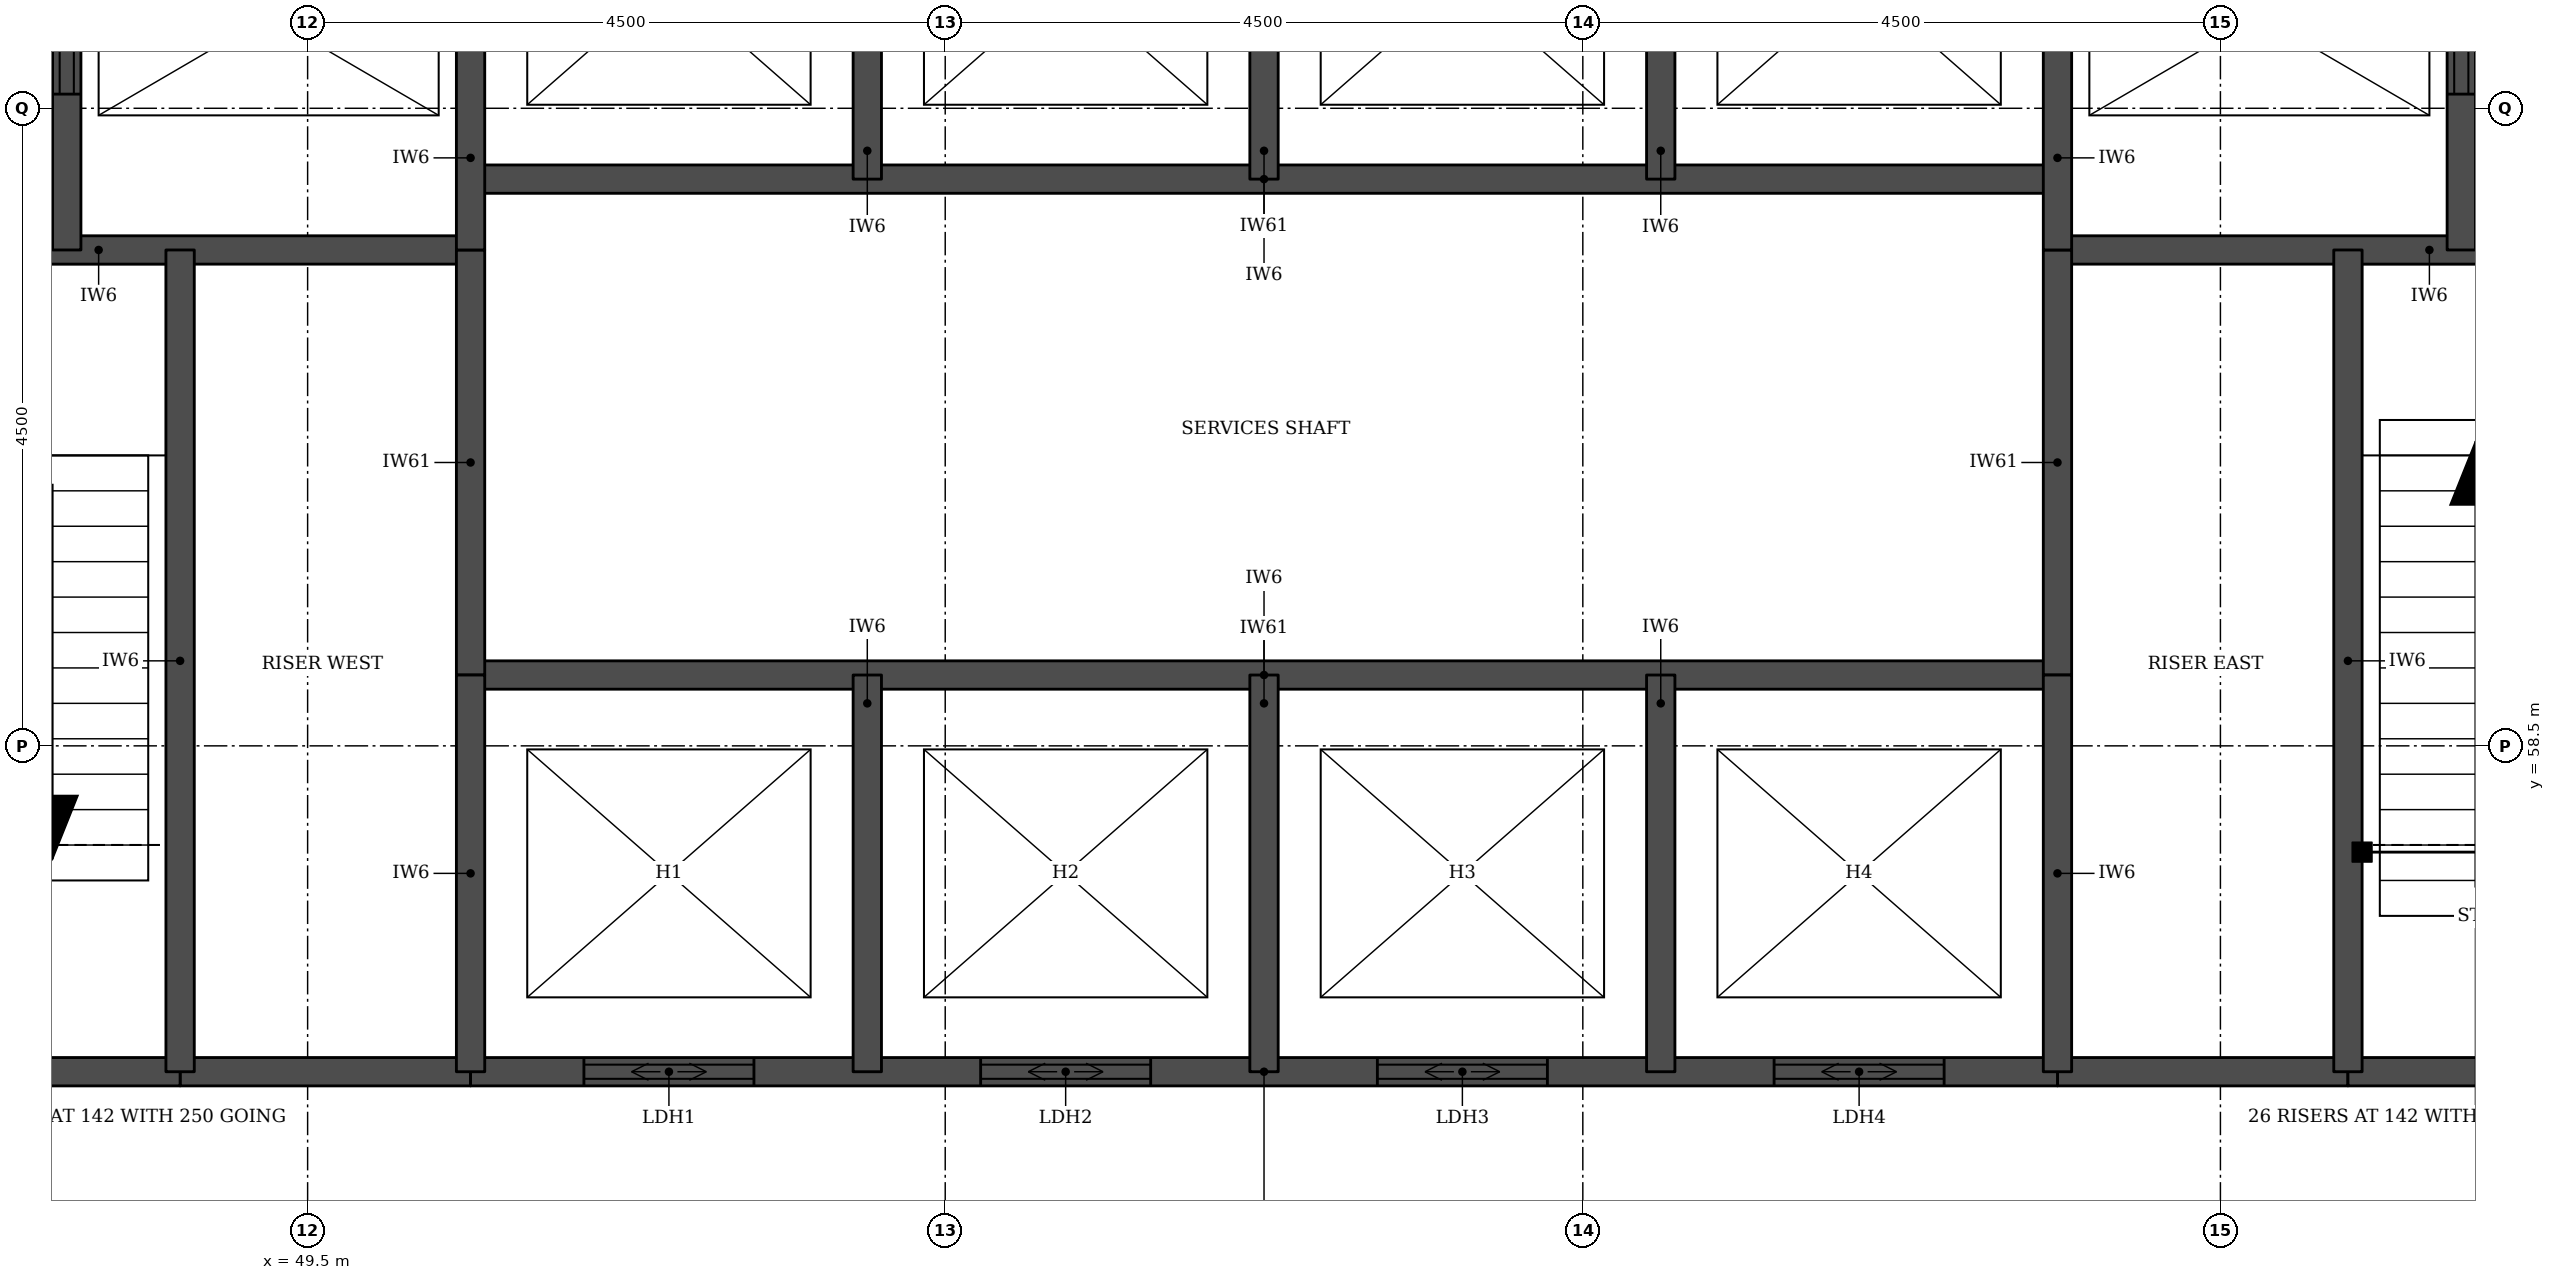
"""IFC4 building model, lengths in metres.
Left out: names, types, materials, properties, quantities, classifications, styles, units other than length and angle.
Written with IfcOpenShell. Run it as: python <this file> out.ifc"""

import sys

from ifc_helpers import new_model, si_unit, direction, frame, frame_2d, origin, place, context, subcontext, project, spatial, rectangle, extrude, element, fill, save


model = new_model("IFC4")
c1 = context("Model", 3, precision=1e-05, world=origin(), true_north=direction((0.0, 1.0)))
c2 = subcontext(c1, "Body", "Model", "MODEL_VIEW")
j1 = project(units=[si_unit("LENGTHUNIT", "METRE"), si_unit("PLANEANGLEUNIT", "RADIAN")], contexts=[c1])
p1 = place(None, origin())
s1 = spatial("IfcSite", under=j1, at=p1, CompositionType="ELEMENT")
p2 = place(p1, origin())
s2 = spatial("IfcBuilding", under=s1, at=p2, CompositionType="ELEMENT")
p3 = place(p2, frame((0.0, 0.0, 223.0)))
s3 = spatial("IfcBuildingStorey", under=s2, at=p3, CompositionType="ELEMENT", Elevation=223.0)
for number, where, z_axis, x_axis in (
    (1, (48.6, 56.2, 0.0), (0.0, 0.0, 1.0), (1.0, 0.0, 0.0)),
    (2, (61.85, 56.2, 0.0), (0.0, 0.0, 1.0), (1.0, 0.0, 0.0)),
):
    element("IfcWall", number, at=place(p3, frame(where, z_axis=z_axis, x_axis=x_axis)), inside=s3, PredefinedType="SOLIDWALL", context=c2, shape_type="SweptSolid", body=[
        extrude(rectangle(XDim=2.05, YDim=0.2, at=frame_2d((1.025, 0.0))), origin(), (0.0, 0.0, 1.0), 3.55),
    ])
p4 = place(p3, frame((45.4, 56.2, 0.0), z_axis=(0.0, 0.0, 1.0), x_axis=(1.0, 0.0, 0.0)))
e3 = element("IfcWall", 3, at=p4, inside=s3, PredefinedType="SOLIDWALL", context=c2, shape_type="SweptSolid", body=[
    extrude(rectangle(XDim=3.2, YDim=0.2, at=frame_2d((1.6, 0.0))), origin(), (0.0, 0.0, 1.0), 3.55),
])
p5 = place(p3, frame((50.65, 56.2, 0.0), z_axis=(0.0, 0.0, 1.0), x_axis=(1.0, 0.0, 0.0)))
e4 = element("IfcWall", 4, at=p5, inside=s3, PredefinedType="SOLIDWALL", context=c2, shape_type="SweptSolid", body=[
    extrude(rectangle(XDim=11.2, YDim=0.2, at=frame_2d((5.6, 0.0))), origin(), (0.0, 0.0, 1.0), 3.55),
])
p6 = place(p5, frame((0.8, 0.0, 0.0)))
e5 = element("IfcOpeningElement", 5, at=p6, cuts=e4, PredefinedType="OPENING", context=c2, shape_type="SweptSolid", body=[
    extrude(rectangle(XDim=1.2, YDim=2.1, at=frame_2d((0.6, 1.05))), frame((0.0, 0.11, 0.0), z_axis=(0.0, -1.0, 0.0), x_axis=(1.0, 0.0, 0.0)), (0.0, 0.0, 1.0), 0.22),
])
p7 = place(p5, frame((3.6, 0.0, 0.0)))
e6 = element("IfcOpeningElement", 6, at=p7, cuts=e4, PredefinedType="OPENING", context=c2, shape_type="SweptSolid", body=[
    extrude(rectangle(XDim=1.2, YDim=2.1, at=frame_2d((0.6, 1.05))), frame((0.0, 0.11, 0.0), z_axis=(0.0, -1.0, 0.0), x_axis=(1.0, 0.0, 0.0)), (0.0, 0.0, 1.0), 0.22),
])
p8 = place(p5, frame((6.4, 0.0, 0.0)))
e7 = element("IfcOpeningElement", 7, at=p8, cuts=e4, PredefinedType="OPENING", context=c2, shape_type="SweptSolid", body=[
    extrude(rectangle(XDim=1.2, YDim=2.1, at=frame_2d((0.6, 1.05))), frame((0.0, 0.11, 0.0), z_axis=(0.0, -1.0, 0.0), x_axis=(1.0, 0.0, 0.0)), (0.0, 0.0, 1.0), 0.22),
])
p9 = place(p5, frame((9.2, 0.0, 0.0)))
e8 = element("IfcOpeningElement", 8, at=p9, cuts=e4, PredefinedType="OPENING", context=c2, shape_type="SweptSolid", body=[
    extrude(rectangle(XDim=1.2, YDim=2.1, at=frame_2d((0.6, 1.05))), frame((0.0, 0.11, 0.0), z_axis=(0.0, -1.0, 0.0), x_axis=(1.0, 0.0, 0.0)), (0.0, 0.0, 1.0), 0.22),
])
p10 = place(p3, frame((63.9, 56.2, 0.0), z_axis=(0.0, 0.0, 1.0), x_axis=(1.0, 0.0, 0.0)))
e9 = element("IfcWall", 9, at=p10, inside=s3, PredefinedType="SOLIDWALL", context=c2, shape_type="SweptSolid", body=[
    extrude(rectangle(XDim=3.2, YDim=0.2, at=frame_2d((1.6, 0.0))), origin(), (0.0, 0.0, 1.0), 3.55),
])
p11 = place(p3, frame((50.65, 59.0, 0.0), z_axis=(0.0, 0.0, 1.0), x_axis=(1.0, 0.0, 0.0)))
e10 = element("IfcWall", 10, at=p11, inside=s3, PredefinedType="SOLIDWALL", context=c2, shape_type="SweptSolid", body=[
    extrude(rectangle(XDim=11.2, YDim=0.2, at=frame_2d((5.6, 0.0))), origin(), (0.0, 0.0, 1.0), 3.7),
])
for number, where, z_axis, x_axis in (
    (11, (45.4, 62.0, 0.0), (0.0, 0.0, 1.0), (1.0, 0.0, 0.0)),
    (12, (61.85, 62.0, 0.0), (0.0, 0.0, 1.0), (1.0, 0.0, 0.0)),
):
    element("IfcWall", number, at=place(p3, frame(where, z_axis=z_axis, x_axis=x_axis)), inside=s3, PredefinedType="SOLIDWALL", context=c2, shape_type="SweptSolid", body=[
        extrude(rectangle(XDim=5.25, YDim=0.2, at=frame_2d((2.625, 0.0))), origin(), (0.0, 0.0, 1.0), 3.55),
    ])
p12 = place(p3, frame((50.65, 62.5, 0.0), z_axis=(0.0, 0.0, 1.0), x_axis=(1.0, 0.0, 0.0)))
e13 = element("IfcWall", 13, at=p12, inside=s3, PredefinedType="SOLIDWALL", context=c2, shape_type="SweptSolid", body=[
    extrude(rectangle(XDim=11.2, YDim=0.2, at=frame_2d((5.6, 0.0))), origin(), (0.0, 0.0, 1.0), 3.7),
])
p13 = place(p3, frame((47.8, 62.0, 0.0), z_axis=(0.0, 0.0, 1.0), x_axis=(0.0, 1.0, 0.0)))
e14 = element("IfcWall", 14, at=p13, inside=s3, PredefinedType="SOLIDWALL", context=c2, shape_type="SweptSolid", body=[
    extrude(rectangle(XDim=3.3, YDim=0.2, at=frame_2d((1.65, 0.0))), origin(), (0.0, 0.0, 1.0), 3.55),
])
p14 = place(p13, frame((1.1, 0.0, 0.0)))
e15 = element("IfcOpeningElement", 15, at=p14, cuts=e14, PredefinedType="OPENING", context=c2, shape_type="SweptSolid", body=[
    extrude(rectangle(XDim=1.1, YDim=2.1, at=frame_2d((0.55, 1.05))), frame((0.0, 0.11, 0.0), z_axis=(0.0, -1.0, 0.0), x_axis=(1.0, 0.0, 0.0)), (0.0, 0.0, 1.0), 0.22),
])
p15 = place(p3, frame((48.6, 56.2, 0.0), z_axis=(0.0, 0.0, 1.0), x_axis=(0.0, 1.0, 0.0)))
e16 = element("IfcWall", 16, at=p15, inside=s3, PredefinedType="SOLIDWALL", context=c2, shape_type="SweptSolid", body=[
    extrude(rectangle(XDim=5.8, YDim=0.2, at=frame_2d((2.9, 0.0))), origin(), (0.0, 0.0, 1.0), 3.55),
])
p16 = place(p3, frame((50.65, 59.0, 0.0), z_axis=(0.0, 0.0, 1.0), x_axis=(0.0, 1.0, 0.0)))
e17 = element("IfcWall", 17, at=p16, inside=s3, PredefinedType="SOLIDWALL", context=c2, shape_type="SweptSolid", body=[
    extrude(rectangle(XDim=3.0, YDim=0.2, at=frame_2d((1.5, 0.0))), origin(), (0.0, 0.0, 1.0), 3.7),
])
p17 = place(p3, frame((50.65, 56.2, 0.0), z_axis=(0.0, 0.0, 1.0), x_axis=(0.0, 1.0, 0.0)))
e18 = element("IfcWall", 18, at=p17, inside=s3, PredefinedType="SOLIDWALL", context=c2, shape_type="SweptSolid", body=[
    extrude(rectangle(XDim=2.8, YDim=0.2, at=frame_2d((1.4, 0.0))), origin(), (0.0, 0.0, 1.0), 3.55),
])
p18 = place(p3, frame((50.65, 62.0, 0.0), z_axis=(0.0, 0.0, 1.0), x_axis=(0.0, 1.0, 0.0)))
e19 = element("IfcWall", 19, at=p18, inside=s3, PredefinedType="SOLIDWALL", context=c2, shape_type="SweptSolid", body=[
    extrude(rectangle(XDim=3.3, YDim=0.2, at=frame_2d((1.65, 0.0))), origin(), (0.0, 0.0, 1.0), 3.55),
])
for number, where, z_axis, x_axis in (
    (20, (53.45, 56.2, 0.0), (0.0, 0.0, 1.0), (0.0, 1.0, 0.0)),
    (21, (53.45, 62.5, 0.0), (0.0, 0.0, 1.0), (0.0, 1.0, 0.0)),
    (22, (56.25, 56.2, 0.0), (0.0, 0.0, 1.0), (0.0, 1.0, 0.0)),
    (23, (56.25, 62.5, 0.0), (0.0, 0.0, 1.0), (0.0, 1.0, 0.0)),
    (24, (59.05, 56.2, 0.0), (0.0, 0.0, 1.0), (0.0, 1.0, 0.0)),
    (25, (59.05, 62.5, 0.0), (0.0, 0.0, 1.0), (0.0, 1.0, 0.0)),
):
    element("IfcWall", number, at=place(p3, frame(where, z_axis=z_axis, x_axis=x_axis)), inside=s3, PredefinedType="SOLIDWALL", context=c2, shape_type="SweptSolid", body=[
        extrude(rectangle(XDim=2.8, YDim=0.2, at=frame_2d((1.4, 0.0))), origin(), (0.0, 0.0, 1.0), 3.55),
    ])
p19 = place(p3, frame((61.85, 59.0, 0.0), z_axis=(0.0, 0.0, 1.0), x_axis=(0.0, 1.0, 0.0)))
e26 = element("IfcWall", 26, at=p19, inside=s3, PredefinedType="SOLIDWALL", context=c2, shape_type="SweptSolid", body=[
    extrude(rectangle(XDim=3.0, YDim=0.2, at=frame_2d((1.5, 0.0))), origin(), (0.0, 0.0, 1.0), 3.7),
])
p20 = place(p3, frame((61.85, 56.2, 0.0), z_axis=(0.0, 0.0, 1.0), x_axis=(0.0, 1.0, 0.0)))
e27 = element("IfcWall", 27, at=p20, inside=s3, PredefinedType="SOLIDWALL", context=c2, shape_type="SweptSolid", body=[
    extrude(rectangle(XDim=2.8, YDim=0.2, at=frame_2d((1.4, 0.0))), origin(), (0.0, 0.0, 1.0), 3.55),
])
p21 = place(p3, frame((61.85, 62.0, 0.0), z_axis=(0.0, 0.0, 1.0), x_axis=(0.0, 1.0, 0.0)))
e28 = element("IfcWall", 28, at=p21, inside=s3, PredefinedType="SOLIDWALL", context=c2, shape_type="SweptSolid", body=[
    extrude(rectangle(XDim=3.3, YDim=0.2, at=frame_2d((1.65, 0.0))), origin(), (0.0, 0.0, 1.0), 3.55),
])
p22 = place(p3, frame((63.9, 56.2, 0.0), z_axis=(0.0, 0.0, 1.0), x_axis=(0.0, 1.0, 0.0)))
e29 = element("IfcWall", 29, at=p22, inside=s3, PredefinedType="SOLIDWALL", context=c2, shape_type="SweptSolid", body=[
    extrude(rectangle(XDim=5.8, YDim=0.2, at=frame_2d((2.9, 0.0))), origin(), (0.0, 0.0, 1.0), 3.55),
])
p23 = place(p3, frame((64.7, 62.0, 0.0), z_axis=(0.0, 0.0, 1.0), x_axis=(0.0, 1.0, 0.0)))
e30 = element("IfcWall", 30, at=p23, inside=s3, PredefinedType="SOLIDWALL", context=c2, shape_type="SweptSolid", body=[
    extrude(rectangle(XDim=3.3, YDim=0.2, at=frame_2d((1.65, 0.0))), origin(), (0.0, 0.0, 1.0), 3.55),
])
p24 = place(p23, frame((1.1, 0.0, 0.0)))
e31 = element("IfcOpeningElement", 31, at=p24, cuts=e30, PredefinedType="OPENING", context=c2, shape_type="SweptSolid", body=[
    extrude(rectangle(XDim=1.1, YDim=2.1, at=frame_2d((0.55, 1.05))), frame((0.0, 0.11, 0.0), z_axis=(0.0, -1.0, 0.0), x_axis=(1.0, 0.0, 0.0)), (0.0, 0.0, 1.0), 0.22),
])
p25 = place(p6, origin())
e32 = element("IfcDoor", 32, at=p25, inside=s3, OperationType="DOUBLE_DOOR_SLIDING", PredefinedType="DOOR", context=c2, shape_type="SweptSolid", body=[
    extrude(rectangle(XDim=1.2, YDim=2.1, at=frame_2d((0.6, 1.05))), frame((0.0, 0.025, 0.0), z_axis=(0.0, -1.0, 0.0), x_axis=(1.0, 0.0, 0.0)), (0.0, 0.0, 1.0), 0.05),
])
fill(e5, e32)
p26 = place(p7, origin())
e33 = element("IfcDoor", 33, at=p26, inside=s3, OperationType="DOUBLE_DOOR_SLIDING", PredefinedType="DOOR", context=c2, shape_type="SweptSolid", body=[
    extrude(rectangle(XDim=1.2, YDim=2.1, at=frame_2d((0.6, 1.05))), frame((0.0, 0.025, 0.0), z_axis=(0.0, -1.0, 0.0), x_axis=(1.0, 0.0, 0.0)), (0.0, 0.0, 1.0), 0.05),
])
fill(e6, e33)
p27 = place(p8, origin())
e34 = element("IfcDoor", 34, at=p27, inside=s3, OperationType="DOUBLE_DOOR_SLIDING", PredefinedType="DOOR", context=c2, shape_type="SweptSolid", body=[
    extrude(rectangle(XDim=1.2, YDim=2.1, at=frame_2d((0.6, 1.05))), frame((0.0, 0.025, 0.0), z_axis=(0.0, -1.0, 0.0), x_axis=(1.0, 0.0, 0.0)), (0.0, 0.0, 1.0), 0.05),
])
fill(e7, e34)
p28 = place(p9, origin())
e35 = element("IfcDoor", 35, at=p28, inside=s3, OperationType="DOUBLE_DOOR_SLIDING", PredefinedType="DOOR", context=c2, shape_type="SweptSolid", body=[
    extrude(rectangle(XDim=1.2, YDim=2.1, at=frame_2d((0.6, 1.05))), frame((0.0, 0.025, 0.0), z_axis=(0.0, -1.0, 0.0), x_axis=(1.0, 0.0, 0.0)), (0.0, 0.0, 1.0), 0.05),
])
fill(e8, e35)
p29 = place(p14, origin())
e36 = element("IfcDoor", 36, at=p29, inside=s3, OperationType="DOUBLE_DOOR_SLIDING", PredefinedType="DOOR", context=c2, shape_type="SweptSolid", body=[
    extrude(rectangle(XDim=1.1, YDim=2.1, at=frame_2d((0.55, 1.05))), frame((0.0, 0.025, 0.0), z_axis=(0.0, -1.0, 0.0), x_axis=(1.0, 0.0, 0.0)), (0.0, 0.0, 1.0), 0.05),
])
fill(e15, e36)
p30 = place(p24, origin())
e37 = element("IfcDoor", 37, at=p30, inside=s3, OperationType="DOUBLE_DOOR_SLIDING", PredefinedType="DOOR", context=c2, shape_type="SweptSolid", body=[
    extrude(rectangle(XDim=1.1, YDim=2.1, at=frame_2d((0.55, 1.05))), frame((0.0, 0.025, 0.0), z_axis=(0.0, -1.0, 0.0), x_axis=(1.0, 0.0, 0.0)), (0.0, 0.0, 1.0), 0.05),
])
fill(e31, e37)
save(model, sys.argv[1])
